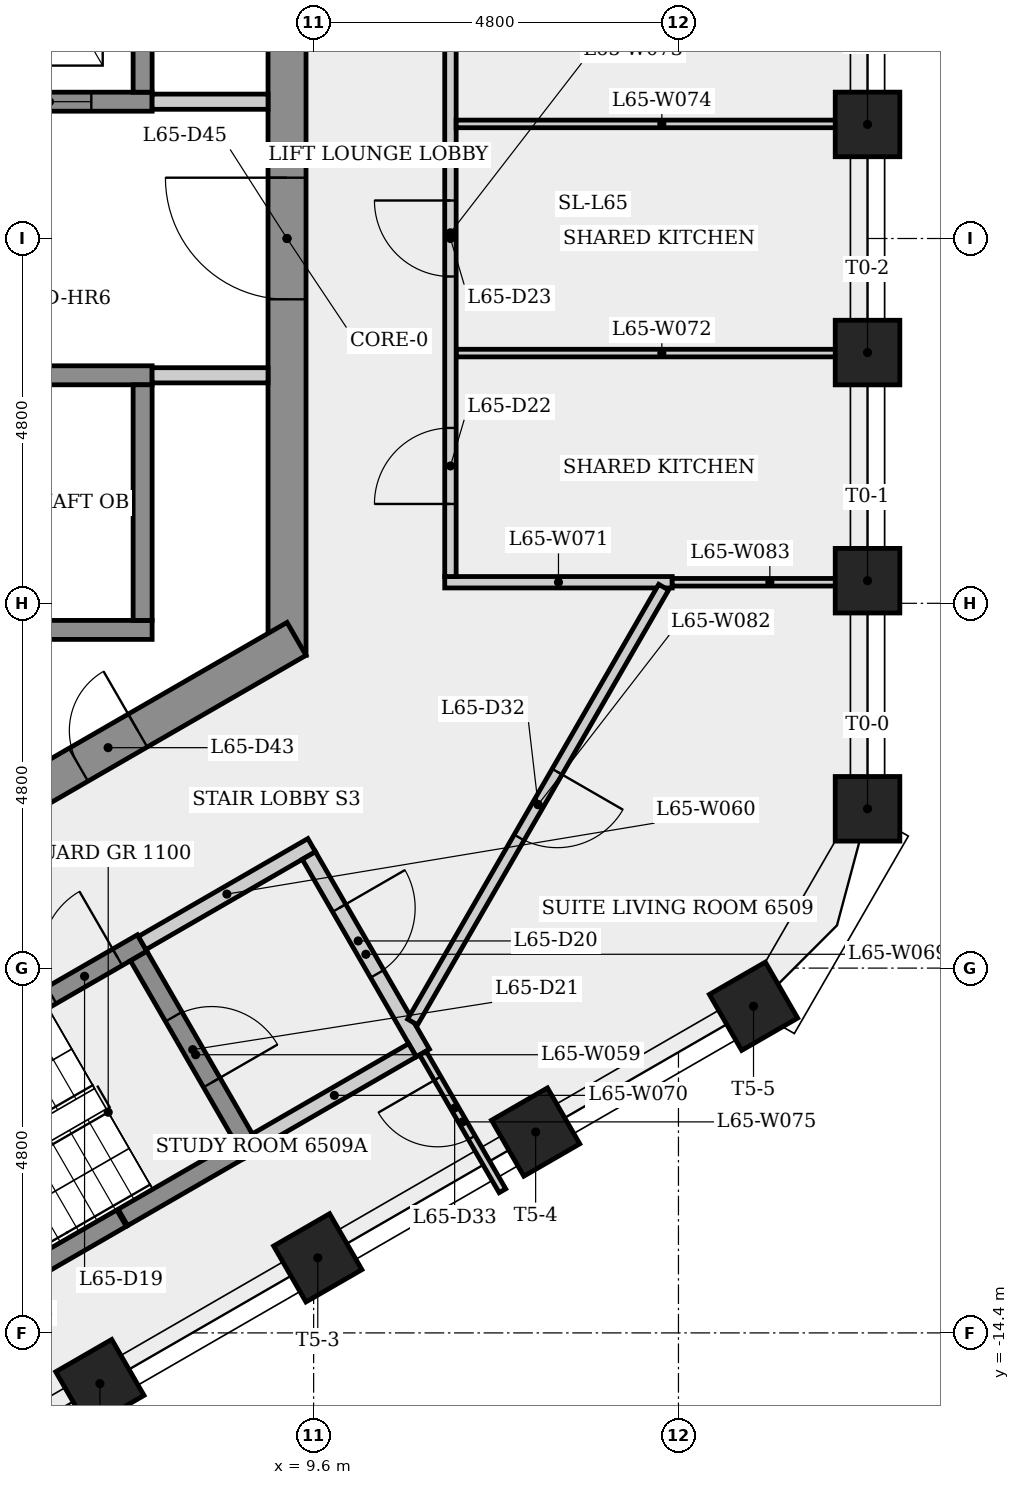
"""IFC4 building model, lengths in metres.
Left out: names, types, materials, properties, quantities, classifications, styles, units other than length and angle.
Written with IfcOpenShell. Run it as: python <this file> out.ifc"""

import sys

from ifc_helpers import new_model, si_unit, direction, frame, frame_2d, origin, origin_2d, place, context, subcontext, project, spatial, rectangle, extrude, element, fill, save


model = new_model("IFC4")
c1 = context("Model", 3, precision=1e-05, world=origin(), true_north=direction((0.0, 1.0)))
c2 = subcontext(c1, "Body", "Model", "MODEL_VIEW")
j1 = project(units=[si_unit("LENGTHUNIT", "METRE"), si_unit("PLANEANGLEUNIT", "RADIAN")], contexts=[c1])
p1 = place(None, origin())
s1 = spatial("IfcSite", under=j1, at=p1, CompositionType="ELEMENT")
p2 = place(p1, origin())
s2 = spatial("IfcBuilding", under=s1, at=p2, CompositionType="ELEMENT")
p3 = place(p2, frame((0.0, 0.0, 242.7)))
s3 = spatial("IfcBuildingStorey", under=s2, at=p3, CompositionType="ELEMENT", Elevation=242.7)
p4 = place(p3, frame((9.25, -5.485, 0.0), z_axis=(0.0, 0.0, 1.0), x_axis=(0.0, 1.0, 0.0)))
e1 = element("IfcWall", 1, at=p4, inside=s3, PredefinedType="SHEAR", context=c2, shape_type="SweptSolid", body=[
    extrude(rectangle(XDim=10.97, YDim=0.5, at=frame_2d((5.485, 0.0))), origin(), (0.0, 0.0, 1.0), 3.4),
])
p5 = place(p4, frame((4.685, 0.0, 0.0)))
e2 = element("IfcOpeningElement", 2, at=p5, cuts=e1, PredefinedType="OPENING", context=c2, shape_type="SweptSolid", body=[
    extrude(rectangle(XDim=1.6, YDim=2.1, at=frame_2d((0.8, 1.05))), frame((0.0, 0.26, 0.0), z_axis=(0.0, -1.0, 0.0), x_axis=(1.0, 0.0, 0.0)), (0.0, 0.0, 1.0), 0.52),
])
p6 = place(p3, frame((-0.125, -10.753, 0.0), z_axis=(0.0, 0.0, 1.0), x_axis=(0.866023993627, 0.500002442456, 0.0)))
e3 = element("IfcWall", 3, at=p6, inside=s3, PredefinedType="SHEAR", context=c2, shape_type="SweptSolid", body=[
    extrude(rectangle(XDim=10.97, YDim=0.5, at=frame_2d((5.485, 0.0))), origin(), (0.0, 0.0, 1.0), 3.4),
])
p7 = place(p6, frame((7.657, 0.0, 0.0)))
e4 = element("IfcOpeningElement", 4, at=p7, cuts=e3, PredefinedType="OPENING", context=c2, shape_type="SweptSolid", body=[
    extrude(rectangle(XDim=0.9, YDim=2.1, at=frame_2d((0.45, 1.05))), frame((0.0, 0.26, 0.0), z_axis=(0.0, -1.0, 0.0), x_axis=(1.0, 0.0, 0.0)), (0.0, 0.0, 1.0), 0.52),
])
for number, where, z_axis, x_axis in (
    (5, (16.887, -7.504, 0.0), (0.0, 0.0, 1.0), (1.0, 0.0, 0.0)),
    (6, (16.887, -4.502, 0.0), (0.0, 0.0, 1.0), (1.0, 0.0, 0.0)),
    (7, (16.887, -1.501, 0.0), (0.0, 0.0, 1.0), (1.0, 0.0, 0.0)),
    (8, (16.887, 1.501, 0.0), (0.0, 0.0, 1.0), (1.0, 0.0, 0.0)),
    (9, (6.788, -15.067, 0.0), (0.0, 0.0, 1.0), (0.5, -0.866, 0.0)),
    (10, (9.655, -13.412, 0.0), (0.0, 0.0, 1.0), (0.5, -0.866, 0.0)),
    (11, (12.521, -11.757, 0.0), (0.0, 0.0, 1.0), (0.5, -0.866, 0.0)),
    (12, (15.387, -10.102, 0.0), (0.0, 0.0, 1.0), (0.5, -0.866, 0.0)),
):
    element("IfcColumn", number, at=place(p3, frame(where, z_axis=z_axis, x_axis=x_axis)), inside=s3, PredefinedType="COLUMN", context=c2, shape_type="SweptSolid", body=[
        extrude(rectangle(XDim=0.85, YDim=0.85, at=origin_2d()), origin(), (0.0, 0.0, 1.0), 3.4),
    ])
p8 = place(p3, frame((-7.475, 1.8, 0.0), z_axis=(0.0, 0.0, 1.0), x_axis=(1.0, 0.0, 0.0)))
e13 = element("IfcWall", 13, at=p8, inside=s3, PredefinedType="SHEAR", context=c2, shape_type="SweptSolid", body=[
    extrude(rectangle(XDim=14.95, YDim=0.25, at=frame_2d((7.475, 0.0))), origin(), (0.0, 0.0, 1.0), 3.05),
])
p9 = place(p8, frame((0.8, 0.0, 0.0)))
e14 = element("IfcOpeningElement", 14, at=p9, cuts=e13, PredefinedType="OPENING", context=c2, shape_type="SweptSolid", body=[
    extrude(rectangle(XDim=1.1, YDim=2.1, at=frame_2d((0.55, 1.05))), frame((0.0, 0.135, 0.0), z_axis=(0.0, -1.0, 0.0), x_axis=(1.0, 0.0, 0.0)), (0.0, 0.0, 1.0), 0.27),
])
p10 = place(p8, frame((3.25, 0.0, 0.0)))
e15 = element("IfcOpeningElement", 15, at=p10, cuts=e13, PredefinedType="OPENING", context=c2, shape_type="SweptSolid", body=[
    extrude(rectangle(XDim=1.1, YDim=2.1, at=frame_2d((0.55, 1.05))), frame((0.0, 0.135, 0.0), z_axis=(0.0, -1.0, 0.0), x_axis=(1.0, 0.0, 0.0)), (0.0, 0.0, 1.0), 0.27),
])
p11 = place(p8, frame((5.7, 0.0, 0.0)))
e16 = element("IfcOpeningElement", 16, at=p11, cuts=e13, PredefinedType="OPENING", context=c2, shape_type="SweptSolid", body=[
    extrude(rectangle(XDim=1.1, YDim=2.1, at=frame_2d((0.55, 1.05))), frame((0.0, 0.135, 0.0), z_axis=(0.0, -1.0, 0.0), x_axis=(1.0, 0.0, 0.0)), (0.0, 0.0, 1.0), 0.27),
])
p12 = place(p8, frame((8.15, 0.0, 0.0)))
e17 = element("IfcOpeningElement", 17, at=p12, cuts=e13, PredefinedType="OPENING", context=c2, shape_type="SweptSolid", body=[
    extrude(rectangle(XDim=1.1, YDim=2.1, at=frame_2d((0.55, 1.05))), frame((0.0, 0.135, 0.0), z_axis=(0.0, -1.0, 0.0), x_axis=(1.0, 0.0, 0.0)), (0.0, 0.0, 1.0), 0.27),
])
p13 = place(p8, frame((10.6, 0.0, 0.0)))
e18 = element("IfcOpeningElement", 18, at=p13, cuts=e13, PredefinedType="OPENING", context=c2, shape_type="SweptSolid", body=[
    extrude(rectangle(XDim=1.1, YDim=2.1, at=frame_2d((0.55, 1.05))), frame((0.0, 0.135, 0.0), z_axis=(0.0, -1.0, 0.0), x_axis=(1.0, 0.0, 0.0)), (0.0, 0.0, 1.0), 0.27),
])
p14 = place(p8, frame((13.05, 0.0, 0.0)))
e19 = element("IfcOpeningElement", 19, at=p14, cuts=e13, PredefinedType="OPENING", context=c2, shape_type="SweptSolid", body=[
    extrude(rectangle(XDim=1.1, YDim=2.1, at=frame_2d((0.55, 1.05))), frame((0.0, 0.135, 0.0), z_axis=(0.0, -1.0, 0.0), x_axis=(1.0, 0.0, 0.0)), (0.0, 0.0, 1.0), 0.27),
])
p15 = place(p3, frame((1.693, -12.532, 0.0), z_axis=(0.0, 0.0, 1.0), x_axis=(0.866031063448, 0.499990197047, 0.0)))
e20 = element("IfcWall", 20, at=p15, inside=s3, PredefinedType="SHEAR", context=c2, shape_type="SweptSolid", body=[
    extrude(rectangle(XDim=6.525, YDim=0.25, at=frame_2d((3.263, 0.0))), origin(), (0.0, 0.0, 1.0), 3.05),
])
p16 = place(p15, frame((5.15, 0.0, 0.0)))
e21 = element("IfcOpeningElement", 21, at=p16, cuts=e20, PredefinedType="OPENING", context=c2, shape_type="SweptSolid", body=[
    extrude(rectangle(XDim=1.0, YDim=2.1, at=frame_2d((0.5, 1.05))), frame((0.0, 0.135, 0.0), z_axis=(0.0, -1.0, 0.0), x_axis=(1.0, 0.0, 0.0)), (0.0, 0.0, 1.0), 0.27),
])
p17 = place(p3, frame((2.575, -5.15, 0.0), z_axis=(0.0, 0.0, 1.0), x_axis=(1.0, 0.0, 0.0)))
e22 = element("IfcWall", 22, at=p17, inside=s3, PredefinedType="SHEAR", context=c2, shape_type="SweptSolid", body=[
    extrude(rectangle(XDim=4.9, YDim=0.25, at=frame_2d((2.45, 0.0))), origin(), (0.0, 0.0, 1.0), 3.05),
])
p18 = place(p3, frame((2.575, -1.8, 0.0), z_axis=(0.0, 0.0, 1.0), x_axis=(1.0, 0.0, 0.0)))
e23 = element("IfcWall", 23, at=p18, inside=s3, PredefinedType="SHEAR", context=c2, shape_type="SweptSolid", body=[
    extrude(rectangle(XDim=4.9, YDim=0.25, at=frame_2d((2.45, 0.0))), origin(), (0.0, 0.0, 1.0), 3.05),
])
p19 = place(p18, frame((0.597, 0.0, 0.0)))
e24 = element("IfcOpeningElement", 24, at=p19, cuts=e23, PredefinedType="OPENING", context=c2, shape_type="SweptSolid", body=[
    extrude(rectangle(XDim=1.1, YDim=2.1, at=frame_2d((0.55, 1.05))), frame((0.0, 0.135, 0.0), z_axis=(0.0, -1.0, 0.0), x_axis=(1.0, 0.0, 0.0)), (0.0, 0.0, 1.0), 0.27),
])
p20 = place(p3, frame((7.073, -12.891, 0.0), z_axis=(0.0, 0.0, 1.0), x_axis=(-0.866023145199, -0.500003911965, 0.0)))
e25 = element("IfcWall", 25, at=p20, inside=s3, PredefinedType="SHEAR", context=c2, shape_type="SweptSolid", body=[
    extrude(rectangle(XDim=4.355, YDim=0.25, at=frame_2d((2.177, 0.0))), origin(), (0.0, 0.0, 1.0), 3.05),
])
p21 = place(p3, frame((7.298, -9.441, 0.0), z_axis=(0.0, 0.0, 1.0), x_axis=(0.50002537861, -0.866010750942, 0.0)))
e26 = element("IfcWall", 26, at=p21, inside=s3, PredefinedType="SHEAR", context=c2, shape_type="SweptSolid", body=[
    extrude(rectangle(XDim=3.0, YDim=0.25, at=frame_2d((1.5, 0.0))), origin(), (0.0, 0.0, 1.0), 3.05),
])
p22 = place(p21, frame((0.923, 0.0, 0.0)))
e27 = element("IfcOpeningElement", 27, at=p22, cuts=e26, PredefinedType="OPENING", context=c2, shape_type="SweptSolid", body=[
    extrude(rectangle(XDim=1.0, YDim=2.1, at=frame_2d((0.5, 1.05))), frame((0.0, 0.135, 0.0), z_axis=(0.0, -1.0, 0.0), x_axis=(1.0, 0.0, 0.0)), (0.0, 0.0, 1.0), 0.27),
])
p23 = place(p3, frame((7.344, -9.27, 0.0), z_axis=(0.0, 0.0, 1.0), x_axis=(0.866005588531, 0.500034319456, 0.0)))
e28 = element("IfcWall", 28, at=p23, inside=s3, PredefinedType="PARTITIONING", context=c2, shape_type="SweptSolid", body=[
    extrude(rectangle(XDim=2.575, YDim=0.2, at=frame_2d((1.288, 0.0))), origin(), (0.0, 0.0, 1.0), 3.05),
])
p24 = place(p3, frame((7.475, 1.8, 0.0), z_axis=(0.0, 0.0, 1.0), x_axis=(1.0, 0.0, 0.0)))
e29 = element("IfcWall", 29, at=p24, inside=s3, PredefinedType="PARTITIONING", context=c2, shape_type="SweptSolid", body=[
    extrude(rectangle(XDim=1.525, YDim=0.2, at=frame_2d((0.763, 0.0))), origin(), (0.0, 0.0, 1.0), 3.05),
])
for number, where, z_axis, x_axis in (
    (30, (7.35, -1.925, 0.0), (0.0, 0.0, 1.0), (0.0, -1.0, 0.0)),
    (31, (7.35, 5.025, 0.0), (0.0, 0.0, 1.0), (0.0, -1.0, 0.0)),
):
    element("IfcWall", number, at=place(p3, frame(where, z_axis=z_axis, x_axis=x_axis)), inside=s3, PredefinedType="SHEAR", context=c2, shape_type="SweptSolid", body=[
        extrude(rectangle(XDim=3.1, YDim=0.25, at=frame_2d((1.55, 0.0))), origin(), (0.0, 0.0, 1.0), 3.4),
    ])
p25 = place(p3, frame((8.627, -11.993, 0.0), z_axis=(0.0, 0.0, 1.0), x_axis=(-0.866059624469, -0.499940723351, 0.0)))
e32 = element("IfcWall", 32, at=p25, inside=s3, PredefinedType="SHEAR", context=c2, shape_type="SweptSolid", body=[
    extrude(rectangle(XDim=1.775, YDim=0.25, at=frame_2d((0.888, 0.0))), origin(), (0.0, 0.0, 1.0), 3.05),
])
p26 = place(p3, frame((9.0, -1.8, 0.0), z_axis=(0.0, 0.0, 1.0), x_axis=(-1.0, 0.0, 0.0)))
e33 = element("IfcWall", 33, at=p26, inside=s3, PredefinedType="PARTITIONING", context=c2, shape_type="SweptSolid", body=[
    extrude(rectangle(XDim=1.525, YDim=0.2, at=frame_2d((0.763, 0.0))), origin(), (0.0, 0.0, 1.0), 3.05),
])
p27 = place(p3, frame((9.537, -8.119, 0.0), z_axis=(0.0, 0.0, 1.0), x_axis=(0.499990139034, -0.866031096941, 0.0)))
e34 = element("IfcWall", 34, at=p27, inside=s3, PredefinedType="PARTITIONING", context=c2, shape_type="SweptSolid", body=[
    extrude(rectangle(XDim=3.0, YDim=0.2, at=frame_2d((1.5, 0.0))), origin(), (0.0, 0.0, 1.0), 3.05),
])
p28 = place(p27, frame((0.797, 0.0, 0.0)))
e35 = element("IfcOpeningElement", 35, at=p28, cuts=e34, PredefinedType="OPENING", context=c2, shape_type="SweptSolid", body=[
    extrude(rectangle(XDim=1.0, YDim=2.1, at=frame_2d((0.5, 1.05))), frame((0.0, 0.11, 0.0), z_axis=(0.0, -1.0, 0.0), x_axis=(1.0, 0.0, 0.0)), (0.0, 0.0, 1.0), 0.22),
])
p29 = place(p3, frame((10.901, -10.681, 0.0), z_axis=(0.0, 0.0, 1.0), x_axis=(-0.866007538022, -0.500030943131, 0.0)))
e36 = element("IfcWall", 36, at=p29, inside=s3, PredefinedType="PARTITIONING", context=c2, shape_type="SweptSolid", body=[
    extrude(rectangle(XDim=2.375, YDim=0.2, at=frame_2d((1.188, 0.0))), origin(), (0.0, 0.0, 1.0), 3.05),
])
p30 = place(p3, frame((11.325, -4.523, 0.0), z_axis=(0.0, 0.0, 1.0), x_axis=(1.0, 0.0, 0.0)))
e37 = element("IfcWall", 37, at=p30, inside=s3, PredefinedType="PARTITIONING", context=c2, shape_type="SweptSolid", body=[
    extrude(rectangle(XDim=2.993, YDim=0.15, at=frame_2d((1.496, 0.0))), origin(), (0.0, 0.0, 1.0), 3.05),
])
p31 = place(p3, frame((11.475, -1.508, 0.0), z_axis=(0.0, 0.0, 1.0), x_axis=(1.0, 0.0, 0.0)))
e38 = element("IfcWall", 38, at=p31, inside=s3, PredefinedType="PARTITIONING", context=c2, shape_type="SweptSolid", body=[
    extrude(rectangle(XDim=5.412, YDim=0.1, at=frame_2d((2.706, 0.0))), origin(), (0.0, 0.0, 1.0), 3.05),
])
p32 = place(p3, frame((11.4, -4.448, 0.0), z_axis=(0.0, 0.0, 1.0), x_axis=(0.0, 1.0, 0.0)))
e39 = element("IfcWall", 39, at=p32, inside=s3, PredefinedType="PARTITIONING", context=c2, shape_type="SweptSolid", body=[
    extrude(rectangle(XDim=9.046, YDim=0.15, at=frame_2d((4.523, 0.0))), origin(), (0.0, 0.0, 1.0), 3.05),
])
p33 = place(p32, frame((0.955, 0.0, 0.0)))
e40 = element("IfcOpeningElement", 40, at=p33, cuts=e39, PredefinedType="OPENING", context=c2, shape_type="SweptSolid", body=[
    extrude(rectangle(XDim=1.0, YDim=2.1, at=frame_2d((0.5, 1.05))), frame((0.0, 0.085, 0.0), z_axis=(0.0, -1.0, 0.0), x_axis=(1.0, 0.0, 0.0)), (0.0, 0.0, 1.0), 0.17),
])
p34 = place(p32, frame((3.948, 0.0, 0.0)))
e41 = element("IfcOpeningElement", 41, at=p34, cuts=e39, PredefinedType="OPENING", context=c2, shape_type="SweptSolid", body=[
    extrude(rectangle(XDim=1.0, YDim=2.1, at=frame_2d((0.5, 1.05))), frame((0.0, 0.085, 0.0), z_axis=(0.0, -1.0, 0.0), x_axis=(1.0, 0.0, 0.0)), (0.0, 0.0, 1.0), 0.17),
])
p35 = place(p32, frame((6.963, 0.0, 0.0)))
e42 = element("IfcOpeningElement", 42, at=p35, cuts=e39, PredefinedType="OPENING", context=c2, shape_type="SweptSolid", body=[
    extrude(rectangle(XDim=1.0, YDim=2.1, at=frame_2d((0.5, 1.05))), frame((0.0, 0.085, 0.0), z_axis=(0.0, -1.0, 0.0), x_axis=(1.0, 0.0, 0.0)), (0.0, 0.0, 1.0), 0.17),
])
p36 = place(p3, frame((11.475, 1.508, 0.0), z_axis=(0.0, 0.0, 1.0), x_axis=(1.0, 0.0, 0.0)))
e43 = element("IfcWall", 43, at=p36, inside=s3, PredefinedType="PARTITIONING", context=c2, shape_type="SweptSolid", body=[
    extrude(rectangle(XDim=5.412, YDim=0.1, at=frame_2d((2.706, 0.0))), origin(), (0.0, 0.0, 1.0), 3.05),
])
p37 = place(p3, frame((12.084, -12.53, 0.0), z_axis=(0.0, 0.0, 1.0), x_axis=(-0.499927760501, 0.866067107261, 0.0)))
e44 = element("IfcWall", 44, at=p37, inside=s3, PredefinedType="PARTITIONING", context=c2, shape_type="SweptSolid", body=[
    extrude(rectangle(XDim=2.093, YDim=0.1, at=frame_2d((1.046, 0.0))), origin(), (0.0, 0.0, 1.0), 3.05),
])
p38 = place(p37, frame((0.807, 0.0, 0.0)))
e45 = element("IfcOpeningElement", 45, at=p38, cuts=e44, PredefinedType="OPENING", context=c2, shape_type="SweptSolid", body=[
    extrude(rectangle(XDim=0.9, YDim=2.1, at=frame_2d((0.45, 1.05))), frame((0.0, 0.06, 0.0), z_axis=(0.0, -1.0, 0.0), x_axis=(1.0, 0.0, 0.0)), (0.0, 0.0, 1.0), 0.12),
])
p39 = place(p3, frame((14.205, -4.588, 0.0), z_axis=(0.0, 0.0, 1.0), x_axis=(-0.499994358189, -0.866028661061, 0.0)))
e46 = element("IfcWall", 46, at=p39, inside=s3, PredefinedType="PARTITIONING", context=c2, shape_type="SweptSolid", body=[
    extrude(rectangle(XDim=6.606, YDim=0.15, at=frame_2d((3.303, 0.0))), origin(), (0.0, 0.0, 1.0), 3.05),
])
p40 = place(p39, frame((2.803, 0.0, 0.0)))
e47 = element("IfcOpeningElement", 47, at=p40, cuts=e46, PredefinedType="OPENING", context=c2, shape_type="SweptSolid", body=[
    extrude(rectangle(XDim=1.0, YDim=2.1, at=frame_2d((0.5, 1.05))), frame((0.0, 0.085, 0.0), z_axis=(0.0, -1.0, 0.0), x_axis=(1.0, 0.0, 0.0)), (0.0, 0.0, 1.0), 0.17),
])
p41 = place(p3, frame((16.887, -4.523, 0.0), z_axis=(0.0, 0.0, 1.0), x_axis=(-1.0, 0.0, 0.0)))
e48 = element("IfcWall", 48, at=p41, inside=s3, PredefinedType="PARTITIONING", context=c2, shape_type="SweptSolid", body=[
    extrude(rectangle(XDim=2.57, YDim=0.1, at=frame_2d((1.285, 0.0))), origin(), (0.0, 0.0, 1.0), 3.05),
])
p42 = place(p14, origin())
e49 = element("IfcDoor", 49, at=p42, inside=s3, OperationType="SLIDING_TO_LEFT", PredefinedType="DOOR", context=c2, shape_type="SweptSolid", body=[
    extrude(rectangle(XDim=1.1, YDim=2.1, at=frame_2d((0.55, 1.05))), frame((0.0, 0.025, 0.0), z_axis=(0.0, -1.0, 0.0), x_axis=(1.0, 0.0, 0.0)), (0.0, 0.0, 1.0), 0.05),
])
fill(e19, e49)
p43 = place(p16, origin())
e50 = element("IfcDoor", 50, at=p43, inside=s3, OperationType="SINGLE_SWING_RIGHT", PredefinedType="DOOR", context=c2, shape_type="SweptSolid", body=[
    extrude(rectangle(XDim=1.0, YDim=2.1, at=frame_2d((0.5, 1.05))), frame((0.0, 0.025, 0.0), z_axis=(0.0, -1.0, 0.0), x_axis=(1.0, 0.0, 0.0)), (0.0, 0.0, 1.0), 0.05),
])
fill(e21, e50)
p44 = place(p28, origin())
e51 = element("IfcDoor", 51, at=p44, inside=s3, OperationType="SINGLE_SWING_LEFT", PredefinedType="DOOR", context=c2, shape_type="SweptSolid", body=[
    extrude(rectangle(XDim=1.0, YDim=2.1, at=frame_2d((0.5, 1.05))), frame((0.0, 0.025, 0.0), z_axis=(0.0, -1.0, 0.0), x_axis=(1.0, 0.0, 0.0)), (0.0, 0.0, 1.0), 0.05),
])
fill(e35, e51)
p45 = place(p22, origin())
e52 = element("IfcDoor", 52, at=p45, inside=s3, OperationType="SINGLE_SWING_RIGHT", PredefinedType="DOOR", context=c2, shape_type="SweptSolid", body=[
    extrude(rectangle(XDim=1.0, YDim=2.1, at=frame_2d((0.5, 1.05))), frame((0.0, 0.025, 0.0), z_axis=(0.0, -1.0, 0.0), x_axis=(1.0, 0.0, 0.0)), (0.0, 0.0, 1.0), 0.05),
])
fill(e27, e52)
p46 = place(p33, origin())
e53 = element("IfcDoor", 53, at=p46, inside=s3, OperationType="SINGLE_SWING_LEFT", PredefinedType="DOOR", context=c2, shape_type="SweptSolid", body=[
    extrude(rectangle(XDim=1.0, YDim=2.1, at=frame_2d((0.5, 1.05))), frame((0.0, 0.025, 0.0), z_axis=(0.0, -1.0, 0.0), x_axis=(1.0, 0.0, 0.0)), (0.0, 0.0, 1.0), 0.05),
])
fill(e40, e53)
p47 = place(p34, origin())
e54 = element("IfcDoor", 54, at=p47, inside=s3, OperationType="SINGLE_SWING_RIGHT", PredefinedType="DOOR", context=c2, shape_type="SweptSolid", body=[
    extrude(rectangle(XDim=1.0, YDim=2.1, at=frame_2d((0.5, 1.05))), frame((0.0, 0.025, 0.0), z_axis=(0.0, -1.0, 0.0), x_axis=(1.0, 0.0, 0.0)), (0.0, 0.0, 1.0), 0.05),
])
fill(e41, e54)
p48 = place(p40, origin())
e55 = element("IfcDoor", 55, at=p48, inside=s3, OperationType="SINGLE_SWING_LEFT", PredefinedType="DOOR", context=c2, shape_type="SweptSolid", body=[
    extrude(rectangle(XDim=1.0, YDim=2.1, at=frame_2d((0.5, 1.05))), frame((0.0, 0.025, 0.0), z_axis=(0.0, -1.0, 0.0), x_axis=(1.0, 0.0, 0.0)), (0.0, 0.0, 1.0), 0.05),
])
fill(e47, e55)
p49 = place(p38, origin())
e56 = element("IfcDoor", 56, at=p49, inside=s3, OperationType="SINGLE_SWING_RIGHT", PredefinedType="DOOR", context=c2, shape_type="SweptSolid", body=[
    extrude(rectangle(XDim=0.9, YDim=2.1, at=frame_2d((0.45, 1.05))), frame((0.0, 0.025, 0.0), z_axis=(0.0, -1.0, 0.0), x_axis=(1.0, 0.0, 0.0)), (0.0, 0.0, 1.0), 0.05),
])
fill(e45, e56)
p50 = place(p7, origin())
e57 = element("IfcDoor", 57, at=p50, inside=s3, OperationType="SINGLE_SWING_RIGHT", PredefinedType="DOOR", context=c2, shape_type="SweptSolid", body=[
    extrude(rectangle(XDim=0.9, YDim=2.1, at=frame_2d((0.45, 1.05))), frame((0.0, 0.025, 0.0), z_axis=(0.0, -1.0, 0.0), x_axis=(1.0, 0.0, 0.0)), (0.0, 0.0, 1.0), 0.05),
])
fill(e4, e57)
p51 = place(p5, origin())
e58 = element("IfcDoor", 58, at=p51, inside=s3, OperationType="SINGLE_SWING_RIGHT", PredefinedType="DOOR", context=c2, shape_type="SweptSolid", body=[
    extrude(rectangle(XDim=1.6, YDim=2.1, at=frame_2d((0.8, 1.05))), frame((0.0, 0.025, 0.0), z_axis=(0.0, -1.0, 0.0), x_axis=(1.0, 0.0, 0.0)), (0.0, 0.0, 1.0), 0.05),
])
fill(e2, e58)
save(model, sys.argv[1])
